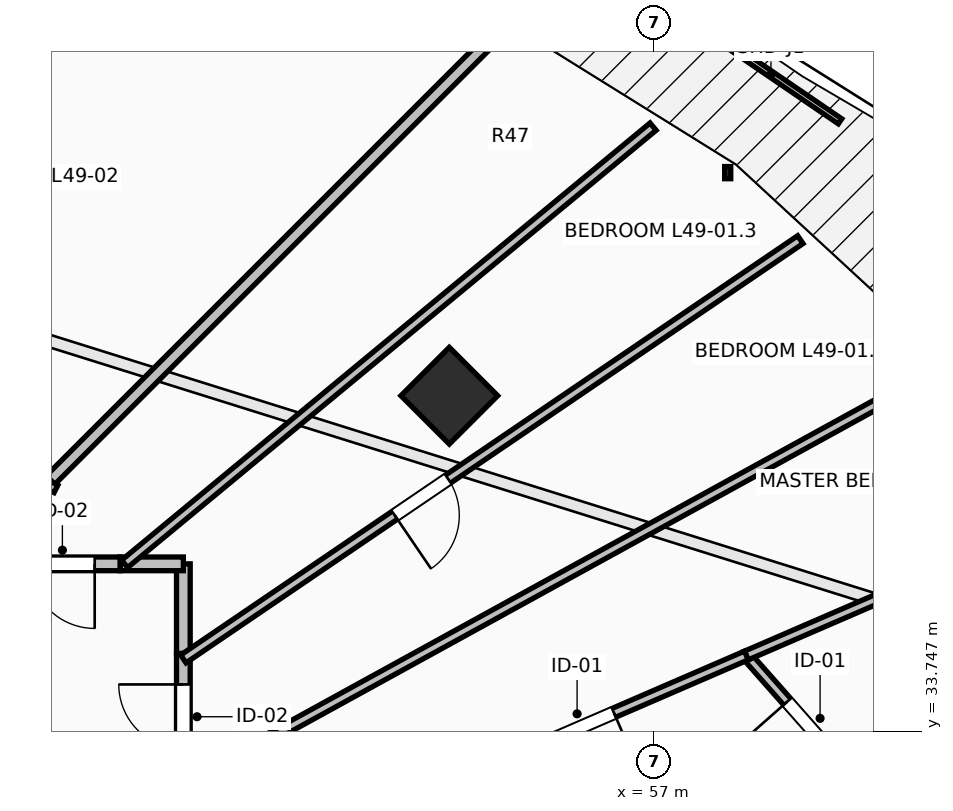
"""IFC4 building model, lengths in metres.
Left out: names, types, materials, properties, quantities, classifications, styles, units other than length and angle.
Written with IfcOpenShell. Run it as: python <this file> out.ifc"""

import sys

from ifc_helpers import new_model, si_unit, direction, frame, frame_2d, origin, origin_2d, place, context, subcontext, project, spatial, rectangle, extrude, element, fill, save


model = new_model("IFC4")
c1 = context("Model", 3, precision=1e-05, world=origin(), true_north=direction((0.0, 1.0)))
c2 = subcontext(c1, "Body", "Model", "MODEL_VIEW")
j1 = project(units=[si_unit("LENGTHUNIT", "METRE"), si_unit("PLANEANGLEUNIT", "RADIAN")], contexts=[c1])
p1 = place(None, origin())
s1 = spatial("IfcSite", under=j1, at=p1, CompositionType="ELEMENT")
p2 = place(p1, origin())
s2 = spatial("IfcBuilding", under=s1, at=p2, CompositionType="ELEMENT")
p3 = place(p2, frame((0.0, 0.0, 182.6)))
s3 = spatial("IfcBuildingStorey", under=s2, at=p3, CompositionType="ELEMENT", Elevation=182.6)
p4 = place(p3, frame((54.299, 38.162, 0.0), z_axis=(0.0, 0.0, 1.0), x_axis=(0.707106781187, 0.707106781187, 0.0)))
e1 = element("IfcColumn", 1, at=p4, inside=s3, PredefinedType="COLUMN", context=c2, shape_type="SweptSolid", body=[
    extrude(rectangle(XDim=0.9, YDim=0.9, at=origin_2d()), origin(), (0.0, 0.0, 1.0), 3.5),
])
p5 = place(p3, frame((50.8, 33.105, 0.0), z_axis=(0.0, 0.0, 1.0), x_axis=(0.0, 1.0, 0.0)))
e2 = element("IfcWall", 2, at=p5, inside=s3, PredefinedType="PARTITIONING", context=c2, shape_type="SweptSolid", body=[
    extrude(rectangle(XDim=1.667, YDim=0.18, at=frame_2d((0.833, 0.0))), origin(), (0.0, 0.0, 1.0), 2.432),
])
p6 = place(p5, frame((0.408, 0.0, 0.0)))
e3 = element("IfcOpeningElement", 3, at=p6, cuts=e2, PredefinedType="OPENING", context=c2, shape_type="SweptSolid", body=[
    extrude(rectangle(XDim=0.85, YDim=2.1, at=frame_2d((0.425, 1.05))), frame((0.0, 0.105, 0.0), z_axis=(0.0, -1.0, 0.0), x_axis=(1.0, 0.0, 0.0)), (0.0, 0.0, 1.0), 0.21),
])
p7 = place(p3, frame((50.8, 34.772, 0.0), z_axis=(0.0, 0.0, 1.0), x_axis=(0.0, 1.0, 0.0)))
e4 = element("IfcWall", 4, at=p7, inside=s3, PredefinedType="PARTITIONING", context=c2, shape_type="SweptSolid", body=[
    extrude(rectangle(XDim=1.178, YDim=0.18, at=frame_2d((0.589, 0.0))), origin(), (0.0, 0.0, 1.0), 2.432),
])
p8 = place(p3, frame((50.8, 35.95, 0.0), z_axis=(0.0, 0.0, 1.0), x_axis=(-1.0, 0.0, 0.0)))
e5 = element("IfcWall", 5, at=p8, inside=s3, PredefinedType="PARTITIONING", context=c2, shape_type="SweptSolid", body=[
    extrude(rectangle(XDim=0.833, YDim=0.18, at=frame_2d((0.417, 0.0))), origin(), (0.0, 0.0, 1.0), 3.24),
])
p9 = place(p3, frame((49.967, 35.95, 0.0), z_axis=(0.0, 0.0, 1.0), x_axis=(-1.0, 0.0, 0.0)))
e6 = element("IfcWall", 6, at=p9, inside=s3, PredefinedType="PARTITIONING", context=c2, shape_type="SweptSolid", body=[
    extrude(rectangle(XDim=2.077, YDim=0.18, at=frame_2d((1.039, 0.0))), origin(), (0.0, 0.0, 1.0), 2.432),
])
p10 = place(p9, frame((0.333, 0.0, 0.0)))
e7 = element("IfcOpeningElement", 7, at=p10, cuts=e6, PredefinedType="OPENING", context=c2, shape_type="SweptSolid", body=[
    extrude(rectangle(XDim=0.85, YDim=2.1, at=frame_2d((0.425, 1.05))), frame((0.0, 0.105, 0.0), z_axis=(0.0, -1.0, 0.0), x_axis=(1.0, 0.0, 0.0)), (0.0, 0.0, 1.0), 0.21),
])
p11 = place(p3, frame((59.877, 32.853, 0.0), z_axis=(0.0, 0.0, 1.0), x_axis=(-0.661957655691, 0.749541234404, 0.0)))
e8 = element("IfcWall", 8, at=p11, inside=s3, PredefinedType="PARTITIONING", context=c2, shape_type="SweptSolid", body=[
    extrude(rectangle(XDim=2.523, YDim=0.125, at=frame_2d((1.261, 0.0))), origin(), (0.0, 0.0, 1.0), 3.24),
])
p12 = place(p11, frame((0.811, 0.0, 0.0)))
e9 = element("IfcOpeningElement", 9, at=p12, cuts=e8, PredefinedType="OPENING", context=c2, shape_type="SweptSolid", body=[
    extrude(rectangle(XDim=0.9, YDim=2.1, at=frame_2d((0.45, 1.05))), frame((0.0, 0.077, 0.0), z_axis=(0.0, -1.0, 0.0), x_axis=(1.0, 0.0, 0.0)), (0.0, 0.0, 1.0), 0.155),
])
p13 = place(p3, frame((58.207, 34.744, 0.0), z_axis=(0.0, 0.0, 1.0), x_axis=(0.917748928086, 0.397161056748, 0.0)))
e10 = element("IfcWall", 10, at=p13, inside=s3, PredefinedType="PARTITIONING", context=c2, shape_type="SweptSolid", body=[
    extrude(rectangle(XDim=2.18, YDim=0.125, at=frame_2d((1.09, 0.0))), origin(), (0.0, 0.0, 1.0), 3.24),
])
p14 = place(p3, frame((58.207, 34.744, 0.0), z_axis=(0.0, 0.0, 1.0), x_axis=(-0.917771035239, -0.397109968241, 0.0)))
e11 = element("IfcWall", 11, at=p14, inside=s3, PredefinedType="PARTITIONING", context=c2, shape_type="SweptSolid", body=[
    extrude(rectangle(XDim=4.697, YDim=0.125, at=frame_2d((2.349, 0.0))), origin(), (0.0, 0.0, 1.0), 2.432),
])
p15 = place(p14, frame((1.898, 0.0, 0.0)))
e12 = element("IfcOpeningElement", 12, at=p15, cuts=e11, PredefinedType="OPENING", context=c2, shape_type="SweptSolid", body=[
    extrude(rectangle(XDim=0.9, YDim=2.1, at=frame_2d((0.45, 1.05))), frame((0.0, 0.077, 0.0), z_axis=(0.0, -1.0, 0.0), x_axis=(1.0, 0.0, 0.0)), (0.0, 0.0, 1.0), 0.155),
])
p16 = place(p3, frame((60.761, 38.513, 0.0), z_axis=(0.0, 0.0, 1.0), x_axis=(-0.876315654865, -0.481737348602, 0.0)))
e13 = element("IfcWall", 13, at=p16, inside=s3, PredefinedType="PARTITIONING", context=c2, shape_type="SweptSolid", body=[
    extrude(rectangle(XDim=11.367, YDim=0.125, at=frame_2d((5.684, 0.0))), origin(), (0.0, 0.0, 1.0), 2.432),
])
p17 = place(p3, frame((58.917, 40.215, 0.0), z_axis=(0.0, 0.0, 1.0), x_axis=(-0.827087951184, -0.562072522906, 0.0)))
e14 = element("IfcWall", 14, at=p17, inside=s3, PredefinedType="PARTITIONING", context=c2, shape_type="SweptSolid", body=[
    extrude(rectangle(XDim=9.814, YDim=0.125, at=frame_2d((4.907, 0.0))), origin(), (0.0, 0.0, 1.0), 2.432),
])
p18 = place(p17, frame((5.602, 0.0, 0.0)))
e15 = element("IfcOpeningElement", 15, at=p18, cuts=e14, PredefinedType="OPENING", context=c2, shape_type="SweptSolid", body=[
    extrude(rectangle(XDim=0.85, YDim=2.1, at=frame_2d((0.425, 1.05))), frame((0.0, 0.077, 0.0), z_axis=(0.0, -1.0, 0.0), x_axis=(1.0, 0.0, 0.0)), (0.0, 0.0, 1.0), 0.155),
])
p19 = place(p3, frame((56.98, 41.702, 0.0), z_axis=(0.0, 0.0, 1.0), x_axis=(-0.770511618294, -0.637425953405, 0.0)))
e16 = element("IfcWall", 16, at=p19, inside=s3, PredefinedType="PARTITIONING", context=c2, shape_type="SweptSolid", body=[
    extrude(rectangle(XDim=9.024, YDim=0.125, at=frame_2d((4.512, 0.0))), origin(), (0.0, 0.0, 1.0), 2.774),
])
p20 = place(p3, frame((54.959, 42.959, 0.0), z_axis=(0.0, 0.0, 1.0), x_axis=(-0.707106781187, -0.707106781187, 0.0)))
e17 = element("IfcWall", 17, at=p20, inside=s3, PredefinedType="PARTITIONING", context=c2, shape_type="SweptSolid", body=[
    extrude(rectangle(XDim=8.492, YDim=0.16, at=frame_2d((4.246, 0.0))), origin(), (0.0, 0.0, 1.0), 2.774),
])
p21 = place(p3, frame((49.053, 37.053, 0.0), z_axis=(0.0, 0.0, 1.0), x_axis=(-0.707106781187, -0.707106781187, 0.0)))
e18 = element("IfcWall", 18, at=p21, inside=s3, PredefinedType="PARTITIONING", context=c2, shape_type="SweptSolid", body=[
    extrude(rectangle(XDim=1.7, YDim=0.16, at=frame_2d((0.85, 0.0))), origin(), (0.0, 0.0, 1.0), 2.432),
])
p22 = place(p3, frame((46.369, 38.328, 0.0), z_axis=(0.0, 0.0, 1.0), x_axis=(0.892472891666, -0.451101028199, 0.0)))
e19 = element("IfcWall", 19, at=p22, inside=s3, PredefinedType="PARTITIONING", context=c2, shape_type="SweptSolid", body=[
    extrude(rectangle(XDim=3.086, YDim=0.11, at=frame_2d((1.543, 0.0))), origin(), (0.0, 0.0, 1.0), 2.432),
])
p23 = place(p12, origin())
e20 = element("IfcDoor", 20, at=p23, inside=s3, OperationType="SINGLE_SWING_RIGHT", PredefinedType="DOOR", context=c2, shape_type="SweptSolid", body=[
    extrude(rectangle(XDim=0.9, YDim=2.1, at=frame_2d((0.45, 1.05))), frame((0.0, 0.025, 0.0), z_axis=(0.0, -1.0, 0.0), x_axis=(1.0, 0.0, 0.0)), (0.0, 0.0, 1.0), 0.05),
])
fill(e9, e20)
p24 = place(p15, origin())
e21 = element("IfcDoor", 21, at=p24, inside=s3, OperationType="SINGLE_SWING_LEFT", PredefinedType="DOOR", context=c2, shape_type="SweptSolid", body=[
    extrude(rectangle(XDim=0.9, YDim=2.1, at=frame_2d((0.45, 1.05))), frame((0.0, 0.025, 0.0), z_axis=(0.0, -1.0, 0.0), x_axis=(1.0, 0.0, 0.0)), (0.0, 0.0, 1.0), 0.05),
])
fill(e12, e21)
p25 = place(p6, origin())
e22 = element("IfcDoor", 22, at=p25, inside=s3, OperationType="SINGLE_SWING_RIGHT", PredefinedType="DOOR", context=c2, shape_type="SweptSolid", body=[
    extrude(rectangle(XDim=0.85, YDim=2.1, at=frame_2d((0.425, 1.05))), frame((0.0, 0.025, 0.0), z_axis=(0.0, -1.0, 0.0), x_axis=(1.0, 0.0, 0.0)), (0.0, 0.0, 1.0), 0.05),
])
fill(e3, e22)
p26 = place(p10, origin())
e23 = element("IfcDoor", 23, at=p26, inside=s3, OperationType="SINGLE_SWING_LEFT", PredefinedType="DOOR", context=c2, shape_type="SweptSolid", body=[
    extrude(rectangle(XDim=0.85, YDim=2.1, at=frame_2d((0.425, 1.05))), frame((0.0, 0.025, 0.0), z_axis=(0.0, -1.0, 0.0), x_axis=(1.0, 0.0, 0.0)), (0.0, 0.0, 1.0), 0.05),
])
fill(e7, e23)
p27 = place(p18, origin())
e24 = element("IfcDoor", 24, at=p27, inside=s3, OperationType="SINGLE_SWING_RIGHT", PredefinedType="DOOR", context=c2, shape_type="SweptSolid", body=[
    extrude(rectangle(XDim=0.85, YDim=2.1, at=frame_2d((0.425, 1.05))), frame((0.0, 0.025, 0.0), z_axis=(0.0, -1.0, 0.0), x_axis=(1.0, 0.0, 0.0)), (0.0, 0.0, 1.0), 0.05),
])
fill(e15, e24)
save(model, sys.argv[1])
